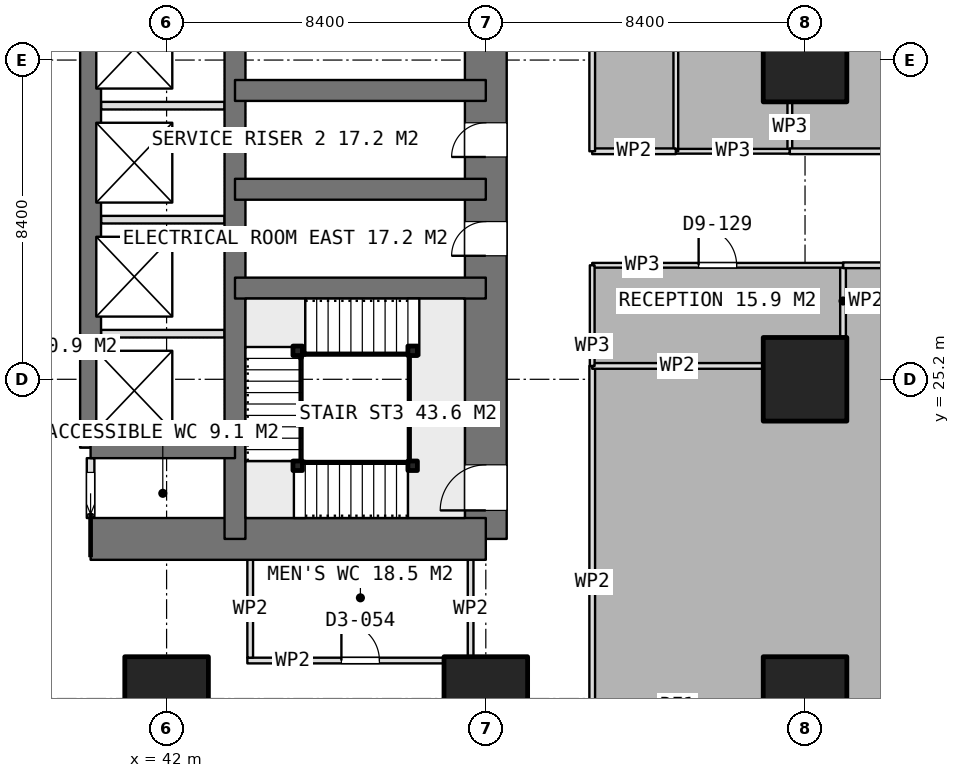
"""IFC4 building model, lengths in metres.
Left out: names, types, materials, properties, quantities, classifications, styles, units other than length and angle.
Written with IfcOpenShell. Run it as: python <this file> out.ifc"""

import sys

from ifc_helpers import new_model, si_unit, direction, frame, frame_2d, origin, origin_2d, place, context, subcontext, project, spatial, rectangle, extrude, element, fill, save


model = new_model("IFC4")
c1 = context("Model", 3, precision=1e-05, world=origin(), true_north=direction((0.0, 1.0)))
c2 = subcontext(c1, "Body", "Model", "MODEL_VIEW")
j1 = project(units=[si_unit("LENGTHUNIT", "METRE"), si_unit("PLANEANGLEUNIT", "RADIAN")], contexts=[c1])
p1 = place(None, origin())
s1 = spatial("IfcSite", under=j1, at=p1, CompositionType="ELEMENT")
p2 = place(p1, origin())
s2 = spatial("IfcBuilding", under=s1, at=p2, CompositionType="ELEMENT")
p3 = place(p2, frame((0.0, 0.0, 47.9)))
s3 = spatial("IfcBuildingStorey", under=s2, at=p3, CompositionType="ELEMENT", Elevation=47.9)
p4 = place(p3, frame((40.0, 21.0, 0.0), z_axis=(0.0, 0.0, 1.0), x_axis=(1.0, 0.0, 0.0)))
e1 = element("IfcWall", 1, at=p4, inside=s3, PredefinedType="SHEAR", context=c2, shape_type="SweptSolid", body=[
    extrude(rectangle(XDim=10.4, YDim=1.1, at=frame_2d((5.2, 0.0))), origin(), (0.0, 0.0, 1.0), 3.75),
])
p5 = place(p3, frame((50.4, 21.0, 0.0), z_axis=(0.0, 0.0, 1.0), x_axis=(0.0, 1.0, 0.0)))
e2 = element("IfcWall", 2, at=p5, inside=s3, PredefinedType="SHEAR", context=c2, shape_type="SweptSolid", body=[
    extrude(rectangle(XDim=25.2, YDim=1.1, at=frame_2d((12.6, 0.0))), origin(), (0.0, 0.0, 1.0), 3.75),
])
p6 = place(p5, frame((16.2, 0.0, 0.0)))
e3 = element("IfcOpeningElement", 3, at=p6, cuts=e2, PredefinedType="OPENING", context=c2, shape_type="SweptSolid", body=[
    extrude(rectangle(XDim=1.2, YDim=2.1, at=frame_2d((0.6, 1.05))), frame((0.0, 0.56, 0.0), z_axis=(0.0, -1.0, 0.0), x_axis=(1.0, 0.0, 0.0)), (0.0, 0.0, 1.0), 1.12),
])
p7 = place(p5, frame((10.05, 0.0, 0.0)))
e4 = element("IfcOpeningElement", 4, at=p7, cuts=e2, PredefinedType="OPENING", context=c2, shape_type="SweptSolid", body=[
    extrude(rectangle(XDim=0.9, YDim=2.1, at=frame_2d((0.45, 1.05))), frame((0.0, 0.56, 0.0), z_axis=(0.0, -1.0, 0.0), x_axis=(1.0, 0.0, 0.0)), (0.0, 0.0, 1.0), 1.12),
])
p8 = place(p5, frame((7.45, 0.0, 0.0)))
e5 = element("IfcOpeningElement", 5, at=p8, cuts=e2, PredefinedType="OPENING", context=c2, shape_type="SweptSolid", body=[
    extrude(rectangle(XDim=0.9, YDim=2.1, at=frame_2d((0.45, 1.05))), frame((0.0, 0.56, 0.0), z_axis=(0.0, -1.0, 0.0), x_axis=(1.0, 0.0, 0.0)), (0.0, 0.0, 1.0), 1.12),
])
p9 = place(p5, frame((0.75, 0.0, 0.0)))
e6 = element("IfcOpeningElement", 6, at=p9, cuts=e2, PredefinedType="OPENING", context=c2, shape_type="SweptSolid", body=[
    extrude(rectangle(XDim=1.2, YDim=2.1, at=frame_2d((0.6, 1.05))), frame((0.0, 0.56, 0.0), z_axis=(0.0, -1.0, 0.0), x_axis=(1.0, 0.0, 0.0)), (0.0, 0.0, 1.0), 1.12),
])
p10 = place(p3, frame((43.8, 21.0, 0.0), z_axis=(0.0, 0.0, 1.0), x_axis=(0.0, 1.0, 0.0)))
e7 = element("IfcWall", 7, at=p10, inside=s3, PredefinedType="SHEAR", context=c2, shape_type="SweptSolid", body=[
    extrude(rectangle(XDim=25.2, YDim=0.55, at=frame_2d((12.6, 0.0))), origin(), (0.0, 0.0, 1.0), 3.75),
])
p11 = place(p3, frame((40.0, 23.4, 0.0), z_axis=(0.0, 0.0, 1.0), x_axis=(0.0, 1.0, 0.0)))
e8 = element("IfcWall", 8, at=p11, inside=s3, PredefinedType="SHEAR", context=c2, shape_type="SweptSolid", body=[
    extrude(rectangle(XDim=18.0, YDim=0.55, at=frame_2d((9.0, 0.0))), origin(), (0.0, 0.0, 1.0), 3.75),
])
p12 = place(p3, frame((40.0, 23.4, 0.0), z_axis=(0.0, 0.0, 1.0), x_axis=(1.0, 0.0, 0.0)))
e9 = element("IfcWall", 9, at=p12, inside=s3, PredefinedType="SHEAR", context=c2, shape_type="SweptSolid", body=[
    extrude(rectangle(XDim=3.8, YDim=0.55, at=frame_2d((1.9, 0.0))), origin(), (0.0, 0.0, 1.0), 3.75),
])
for number, where, z_axis, x_axis in (
    (10, (43.8, 27.6, 0.0), (0.0, 0.0, 1.0), (1.0, 0.0, 0.0)),
    (11, (43.8, 30.2, 0.0), (0.0, 0.0, 1.0), (1.0, 0.0, 0.0)),
    (12, (43.8, 32.8, 0.0), (0.0, 0.0, 1.0), (1.0, 0.0, 0.0)),
):
    element("IfcWall", number, at=place(p3, frame(where, z_axis=z_axis, x_axis=x_axis)), inside=s3, PredefinedType="SHEAR", context=c2, shape_type="SweptSolid", body=[
        extrude(rectangle(XDim=6.6, YDim=0.55, at=frame_2d((3.3, 0.0))), origin(), (0.0, 0.0, 1.0), 3.75),
    ])
for number, where, z_axis, x_axis in (
    (13, (42.0, 16.8, 0.0), (0.0, 0.0, 1.0), (1.0, 0.0, 0.0)),
    (14, (50.4, 16.8, 0.0), (0.0, 0.0, 1.0), (1.0, 0.0, 0.0)),
    (15, (58.8, 16.8, 0.0), (0.0, 0.0, 1.0), (1.0, 0.0, 0.0)),
    (16, (58.8, 25.2, 0.0), (0.0, 0.0, 1.0), (1.0, 0.0, 0.0)),
    (17, (58.8, 33.6, 0.0), (0.0, 0.0, 1.0), (1.0, 0.0, 0.0)),
):
    element("IfcColumn", number, at=place(p3, frame(where, z_axis=z_axis, x_axis=x_axis)), inside=s3, PredefinedType="COLUMN", context=c2, shape_type="SweptSolid", body=[
        extrude(rectangle(XDim=2.2, YDim=2.2, at=origin_2d()), origin(), (0.0, 0.0, 1.0), 3.75),
    ])
for number, where, z_axis, x_axis in (
    (18, (40.275, 26.4, 0.0), (0.0, 0.0, 1.0), (1.0, 0.0, 0.0)),
    (19, (40.275, 29.4, 0.0), (0.0, 0.0, 1.0), (1.0, 0.0, 0.0)),
    (20, (40.275, 32.4, 0.0), (0.0, 0.0, 1.0), (1.0, 0.0, 0.0)),
):
    element("IfcWall", number, at=place(p3, frame(where, z_axis=z_axis, x_axis=x_axis)), inside=s3, PredefinedType="PARTITIONING", context=c2, shape_type="SweptSolid", body=[
        extrude(rectangle(XDim=3.25, YDim=0.2, at=frame_2d((1.625, 0.0))), origin(), (0.0, 0.0, 1.0), 3.5),
    ])
p13 = place(p3, frame((40.0, 21.55, 0.0), z_axis=(0.0, 0.0, 1.0), x_axis=(0.0, 1.0, 0.0)))
e21 = element("IfcWall", 21, at=p13, inside=s3, PredefinedType="PARTITIONING", context=c2, shape_type="SweptSolid", body=[
    extrude(rectangle(XDim=1.575, YDim=0.2, at=frame_2d((0.788, 0.0))), origin(), (0.0, 0.0, 1.0), 3.5),
])
p14 = place(p13, frame((0.1, 0.0, 0.0)))
e22 = element("IfcOpeningElement", 22, at=p14, cuts=e21, PredefinedType="OPENING", context=c2, shape_type="SweptSolid", body=[
    extrude(rectangle(XDim=1.1, YDim=2.1, at=frame_2d((0.55, 1.05))), frame((0.0, 0.11, 0.0), z_axis=(0.0, -1.0, 0.0), x_axis=(1.0, 0.0, 0.0)), (0.0, 0.0, 1.0), 0.22),
])
p15 = place(p3, frame((44.125, 17.8, 0.0), z_axis=(0.0, 0.0, 1.0), x_axis=(1.0, 0.0, 0.0)))
e23 = element("IfcWall", 23, at=p15, inside=s3, PredefinedType="PARTITIONING", context=c2, shape_type="SweptSolid", body=[
    extrude(rectangle(XDim=5.95, YDim=0.15, at=frame_2d((2.975, 0.0))), origin(), (0.0, 0.0, 1.0), 3.5),
])
p16 = place(p15, frame((2.475, 0.0, 0.0)))
e24 = element("IfcOpeningElement", 24, at=p16, cuts=e23, PredefinedType="OPENING", context=c2, shape_type="SweptSolid", body=[
    extrude(rectangle(XDim=1.0, YDim=2.1, at=frame_2d((0.5, 1.05))), frame((0.0, 0.085, 0.0), z_axis=(0.0, -1.0, 0.0), x_axis=(1.0, 0.0, 0.0)), (0.0, 0.0, 1.0), 0.17),
])
for number, where, z_axis, x_axis in (
    (25, (44.2, 17.875, 0.0), (0.0, 0.0, 1.0), (0.0, 1.0, 0.0)),
    (26, (50.0, 17.875, 0.0), (0.0, 0.0, 1.0), (0.0, 1.0, 0.0)),
):
    element("IfcWall", number, at=place(p3, frame(where, z_axis=z_axis, x_axis=x_axis)), inside=s3, PredefinedType="PARTITIONING", context=c2, shape_type="SweptSolid", body=[
        extrude(rectangle(XDim=2.575, YDim=0.15, at=frame_2d((1.288, 0.0))), origin(), (0.0, 0.0, 1.0), 3.5),
    ])
p17 = place(p3, frame((53.2, 14.2, 0.0), z_axis=(0.0, 0.0, 1.0), x_axis=(0.0, 1.0, 0.0)))
e27 = element("IfcWall", 27, at=p17, inside=s3, PredefinedType="PARTITIONING", context=c2, shape_type="SweptSolid", body=[
    extrude(rectangle(XDim=11.352, YDim=0.15, at=frame_2d((5.676, 0.0))), origin(), (0.0, 0.0, 1.0), 3.5),
])
p18 = place(p3, frame((53.2, 25.552, 0.0), z_axis=(0.0, 0.0, 1.0), x_axis=(1.0, 0.0, 0.0)))
e28 = element("IfcWall", 28, at=p18, inside=s3, PredefinedType="PARTITIONING", context=c2, shape_type="SweptSolid", body=[
    extrude(rectangle(XDim=4.48, YDim=0.15, at=frame_2d((2.24, 0.0))), origin(), (0.0, 0.0, 1.0), 3.5),
])
p19 = place(p3, frame((59.8, 26.32, 0.0), z_axis=(0.0, 0.0, 1.0), x_axis=(0.0, 1.0, 0.0)))
e29 = element("IfcWall", 29, at=p19, inside=s3, PredefinedType="PARTITIONING", context=c2, shape_type="SweptSolid", body=[
    extrude(rectangle(XDim=1.88, YDim=0.15, at=frame_2d((0.94, 0.0))), origin(), (0.0, 0.0, 1.0), 3.5),
])
p20 = place(p3, frame((59.8, 28.2, 0.0), z_axis=(0.0, 0.0, 1.0), x_axis=(1.0, 0.0, 0.0)))
e30 = element("IfcWall", 30, at=p20, inside=s3, PredefinedType="PARTITIONING", context=c2, shape_type="SweptSolid", body=[
    extrude(rectangle(XDim=4.719, YDim=0.15, at=frame_2d((2.359, 0.0))), origin(), (0.0, 0.0, 1.0), 3.5),
])
p21 = place(p3, frame((53.2, 28.2, 0.0), z_axis=(0.0, 0.0, 1.0), x_axis=(1.0, 0.0, 0.0)))
e31 = element("IfcWall", 31, at=p21, inside=s3, PredefinedType="PARTITIONING", context=c2, shape_type="SweptSolid", body=[
    extrude(rectangle(XDim=6.6, YDim=0.125, at=frame_2d((3.3, 0.0))), origin(), (0.0, 0.0, 1.0), 3.5),
])
p22 = place(p21, frame((2.8, 0.0, 0.0)))
e32 = element("IfcOpeningElement", 32, at=p22, cuts=e31, PredefinedType="OPENING", context=c2, shape_type="SweptSolid", body=[
    extrude(rectangle(XDim=1.0, YDim=2.1, at=frame_2d((0.5, 1.05))), frame((0.0, 0.073, 0.0), z_axis=(0.0, -1.0, 0.0), x_axis=(1.0, 0.0, 0.0)), (0.0, 0.0, 1.0), 0.145),
])
p23 = place(p3, frame((53.2, 25.552, 0.0), z_axis=(0.0, 0.0, 1.0), x_axis=(0.0, 1.0, 0.0)))
e33 = element("IfcWall", 33, at=p23, inside=s3, PredefinedType="PARTITIONING", context=c2, shape_type="SweptSolid", body=[
    extrude(rectangle(XDim=2.648, YDim=0.125, at=frame_2d((1.324, 0.0))), origin(), (0.0, 0.0, 1.0), 3.5),
])
p24 = place(p3, frame((58.4, 32.48, 0.0), z_axis=(0.0, 0.0, 1.0), x_axis=(0.0, -1.0, 0.0)))
e34 = element("IfcWall", 34, at=p24, inside=s3, PredefinedType="PARTITIONING", context=c2, shape_type="SweptSolid", body=[
    extrude(rectangle(XDim=1.28, YDim=0.125, at=frame_2d((0.64, 0.0))), origin(), (0.0, 0.0, 1.0), 3.5),
])
p25 = place(p3, frame((58.4, 31.2, 0.0), z_axis=(0.0, 0.0, 1.0), x_axis=(-1.0, 0.0, 0.0)))
e35 = element("IfcWall", 35, at=p25, inside=s3, PredefinedType="PARTITIONING", context=c2, shape_type="SweptSolid", body=[
    extrude(rectangle(XDim=3.0, YDim=0.125, at=frame_2d((1.5, 0.0))), origin(), (0.0, 0.0, 1.0), 3.5),
])
p26 = place(p3, frame((55.4, 31.2, 0.0), z_axis=(0.0, 0.0, 1.0), x_axis=(0.0, 1.0, 0.0)))
e36 = element("IfcWall", 36, at=p26, inside=s3, PredefinedType="PARTITIONING", context=c2, shape_type="SweptSolid", body=[
    extrude(rectangle(XDim=21.85, YDim=0.125, at=frame_2d((10.925, 0.0))), origin(), (0.0, 0.0, 1.0), 3.5),
])
p27 = place(p26, frame((10.025, 0.0, 0.0)))
e37 = element("IfcOpeningElement", 37, at=p27, cuts=e36, PredefinedType="OPENING", context=c2, shape_type="SweptSolid", body=[
    extrude(rectangle(XDim=1.8, YDim=2.1, at=frame_2d((0.9, 1.05))), frame((0.0, 0.073, 0.0), z_axis=(0.0, -1.0, 0.0), x_axis=(1.0, 0.0, 0.0)), (0.0, 0.0, 1.0), 0.145),
])
p28 = place(p3, frame((64.391, 31.2, 0.0), z_axis=(0.0, 0.0, 1.0), x_axis=(-1.0, 0.0, 0.0)))
e38 = element("IfcWall", 38, at=p28, inside=s3, PredefinedType="PARTITIONING", context=c2, shape_type="SweptSolid", body=[
    extrude(rectangle(XDim=5.991, YDim=0.15, at=frame_2d((2.996, 0.0))), origin(), (0.0, 0.0, 1.0), 3.5),
])
p29 = place(p3, frame((55.4, 31.2, 0.0), z_axis=(0.0, 0.0, 1.0), x_axis=(-1.0, 0.0, 0.0)))
e39 = element("IfcWall", 39, at=p29, inside=s3, PredefinedType="PARTITIONING", context=c2, shape_type="SweptSolid", body=[
    extrude(rectangle(XDim=2.2, YDim=0.15, at=frame_2d((1.1, 0.0))), origin(), (0.0, 0.0, 1.0), 3.5),
])
p30 = place(p3, frame((53.2, 31.2, 0.0), z_axis=(0.0, 0.0, 1.0), x_axis=(0.0, 1.0, 0.0)))
e40 = element("IfcWall", 40, at=p30, inside=s3, PredefinedType="PARTITIONING", context=c2, shape_type="SweptSolid", body=[
    extrude(rectangle(XDim=21.8, YDim=0.15, at=frame_2d((10.9, 0.0))), origin(), (0.0, 0.0, 1.0), 3.5),
])
p31 = place(p30, frame((10.4, 0.0, 0.0)))
e41 = element("IfcOpeningElement", 41, at=p31, cuts=e40, PredefinedType="OPENING", context=c2, shape_type="SweptSolid", body=[
    extrude(rectangle(XDim=1.0, YDim=2.1, at=frame_2d((0.5, 1.05))), frame((0.0, 0.085, 0.0), z_axis=(0.0, -1.0, 0.0), x_axis=(1.0, 0.0, 0.0)), (0.0, 0.0, 1.0), 0.17),
])
for number, where, z_axis, x_axis in (
    (42, (48.475, 22.925, 0.0), (0.0, 0.0, 1.0), (1.0, 0.0, 0.0)),
    (43, (45.45, 22.925, 0.0), (0.0, 0.0, 1.0), (1.0, 0.0, 0.0)),
    (44, (45.45, 25.95, 0.0), (0.0, 0.0, 1.0), (1.0, 0.0, 0.0)),
    (45, (48.475, 25.95, 0.0), (0.0, 0.0, 1.0), (1.0, 0.0, 0.0)),
):
    element("IfcColumn", number, at=place(p3, frame(where, z_axis=z_axis, x_axis=x_axis)), inside=s3, PredefinedType="COLUMN", context=c2, shape_type="SweptSolid", body=[
        extrude(rectangle(XDim=0.25, YDim=0.25, at=origin_2d()), origin(), (0.0, 0.0, 1.0), 3.75),
    ])
p32 = place(p7, origin())
e46 = element("IfcDoor", 46, at=p32, inside=s3, OperationType="SINGLE_SWING_LEFT", PredefinedType="DOOR", context=c2, shape_type="SweptSolid", body=[
    extrude(rectangle(XDim=0.9, YDim=2.1, at=frame_2d((0.45, 1.05))), frame((0.0, 0.025, 0.0), z_axis=(0.0, -1.0, 0.0), x_axis=(1.0, 0.0, 0.0)), (0.0, 0.0, 1.0), 0.05),
])
fill(e4, e46)
p33 = place(p8, origin())
e47 = element("IfcDoor", 47, at=p33, inside=s3, OperationType="SINGLE_SWING_LEFT", PredefinedType="DOOR", context=c2, shape_type="SweptSolid", body=[
    extrude(rectangle(XDim=0.9, YDim=2.1, at=frame_2d((0.45, 1.05))), frame((0.0, 0.025, 0.0), z_axis=(0.0, -1.0, 0.0), x_axis=(1.0, 0.0, 0.0)), (0.0, 0.0, 1.0), 0.05),
])
fill(e5, e47)
p34 = place(p14, origin())
e48 = element("IfcDoor", 48, at=p34, inside=s3, OperationType="SLIDING_TO_LEFT", PredefinedType="DOOR", context=c2, shape_type="SweptSolid", body=[
    extrude(rectangle(XDim=1.1, YDim=2.1, at=frame_2d((0.55, 1.05))), frame((0.0, 0.025, 0.0), z_axis=(0.0, -1.0, 0.0), x_axis=(1.0, 0.0, 0.0)), (0.0, 0.0, 1.0), 0.05),
])
fill(e22, e48)
p35 = place(p16, origin())
e49 = element("IfcDoor", 49, at=p35, inside=s3, OperationType="SINGLE_SWING_LEFT", PredefinedType="DOOR", context=c2, shape_type="SweptSolid", body=[
    extrude(rectangle(XDim=1.0, YDim=2.1, at=frame_2d((0.5, 1.05))), frame((0.0, 0.025, 0.0), z_axis=(0.0, -1.0, 0.0), x_axis=(1.0, 0.0, 0.0)), (0.0, 0.0, 1.0), 0.05),
])
fill(e24, e49)
p36 = place(p22, origin())
e50 = element("IfcDoor", 50, at=p36, inside=s3, OperationType="SINGLE_SWING_LEFT", PredefinedType="DOOR", context=c2, shape_type="SweptSolid", body=[
    extrude(rectangle(XDim=1.0, YDim=2.1, at=frame_2d((0.5, 1.05))), frame((0.0, 0.025, 0.0), z_axis=(0.0, -1.0, 0.0), x_axis=(1.0, 0.0, 0.0)), (0.0, 0.0, 1.0), 0.05),
])
fill(e32, e50)
p37 = place(p9, origin())
e51 = element("IfcDoor", 51, at=p37, inside=s3, OperationType="SINGLE_SWING_RIGHT", PredefinedType="DOOR", context=c2, shape_type="SweptSolid", body=[
    extrude(rectangle(XDim=1.2, YDim=2.1, at=frame_2d((0.6, 1.05))), frame((0.0, 0.025, 0.0), z_axis=(0.0, -1.0, 0.0), x_axis=(1.0, 0.0, 0.0)), (0.0, 0.0, 1.0), 0.05),
])
fill(e6, e51)
save(model, sys.argv[1])
